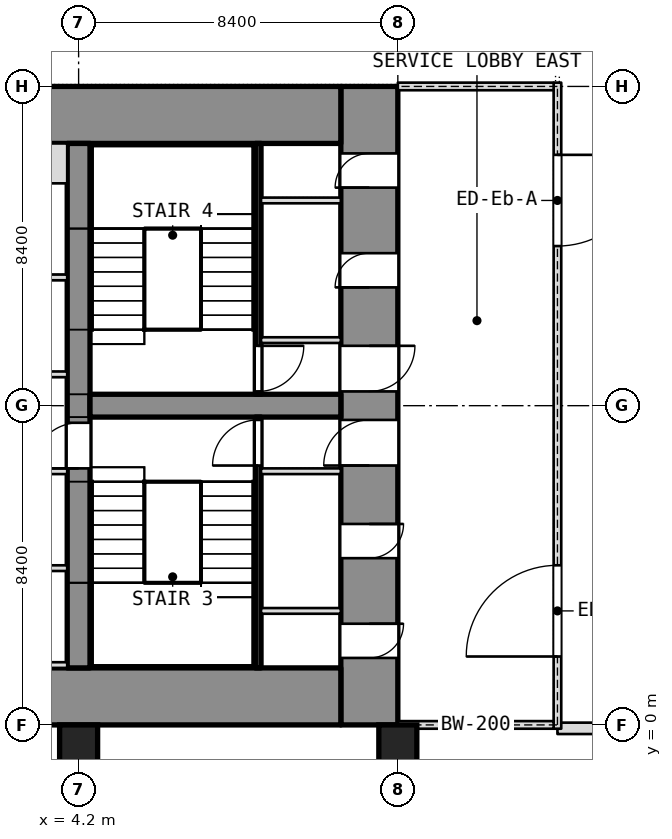
"""IFC4 building model, lengths in metres.
Left out: names, types, materials, properties, quantities, classifications, styles, units other than length and angle.
Written with IfcOpenShell. Run it as: python <this file> out.ifc"""

import sys

from ifc_helpers import new_model, si_unit, direction, frame, frame_2d, origin, origin_2d, place, context, subcontext, project, spatial, rectangle, extrude, element, fill, save


model = new_model("IFC4")
c1 = context("Model", 3, precision=1e-05, world=origin(), true_north=direction((0.0, 1.0)))
c2 = subcontext(c1, "Body", "Model", "MODEL_VIEW")
j1 = project(units=[si_unit("LENGTHUNIT", "METRE"), si_unit("PLANEANGLEUNIT", "RADIAN")], contexts=[c1])
p1 = place(None, origin())
s1 = spatial("IfcSite", under=j1, at=p1, CompositionType="ELEMENT")
p2 = place(p1, origin())
s2 = spatial("IfcBuilding", under=s1, at=p2, CompositionType="ELEMENT")
p3 = place(p2, frame((0.0, 0.0, 21.0)))
s3 = spatial("IfcBuildingStorey", under=s2, at=p3, CompositionType="ELEMENT", Elevation=21.0)
p4 = place(p3, frame((11.85, 0.0, 0.0), z_axis=(0.0, 0.0, 1.0), x_axis=(0.0, 1.0, 0.0)))
e1 = element("IfcWall", 1, at=p4, inside=s3, PredefinedType="SHEAR", context=c2, shape_type="SweptSolid", body=[
    extrude(rectangle(XDim=16.8, YDim=1.5, at=frame_2d((8.4, 0.0))), origin(), (0.0, 0.0, 1.0), 5.0),
])
p5 = place(p4, frame((1.762, 0.0, 0.0)))
e2 = element("IfcOpeningElement", 2, at=p5, cuts=e1, PredefinedType="OPENING", context=c2, shape_type="SweptSolid", body=[
    extrude(rectangle(XDim=0.9, YDim=2.1, at=frame_2d((0.45, 1.05))), frame((0.0, 0.75, 0.0), z_axis=(0.0, -1.0, 0.0), x_axis=(1.0, 0.0, 0.0)), (0.0, 0.0, 1.0), 1.5),
])
p6 = place(p4, frame((4.387, 0.0, 0.0)))
e3 = element("IfcOpeningElement", 3, at=p6, cuts=e1, PredefinedType="OPENING", context=c2, shape_type="SweptSolid", body=[
    extrude(rectangle(XDim=0.9, YDim=2.1, at=frame_2d((0.45, 1.05))), frame((0.0, 0.75, 0.0), z_axis=(0.0, -1.0, 0.0), x_axis=(1.0, 0.0, 0.0)), (0.0, 0.0, 1.0), 1.5),
])
p7 = place(p4, frame((6.825, 0.0, 0.0)))
e4 = element("IfcOpeningElement", 4, at=p7, cuts=e1, PredefinedType="OPENING", context=c2, shape_type="SweptSolid", body=[
    extrude(rectangle(XDim=1.2, YDim=2.1, at=frame_2d((0.6, 1.05))), frame((0.0, 0.75, 0.0), z_axis=(0.0, -1.0, 0.0), x_axis=(1.0, 0.0, 0.0)), (0.0, 0.0, 1.0), 1.5),
])
p8 = place(p4, frame((14.137, 0.0, 0.0)))
e5 = element("IfcOpeningElement", 5, at=p8, cuts=e1, PredefinedType="OPENING", context=c2, shape_type="SweptSolid", body=[
    extrude(rectangle(XDim=0.9, YDim=2.1, at=frame_2d((0.45, 1.05))), frame((0.0, 0.75, 0.0), z_axis=(0.0, -1.0, 0.0), x_axis=(1.0, 0.0, 0.0)), (0.0, 0.0, 1.0), 1.5),
])
p9 = place(p4, frame((11.512, 0.0, 0.0)))
e6 = element("IfcOpeningElement", 6, at=p9, cuts=e1, PredefinedType="OPENING", context=c2, shape_type="SweptSolid", body=[
    extrude(rectangle(XDim=0.9, YDim=2.1, at=frame_2d((0.45, 1.05))), frame((0.0, 0.75, 0.0), z_axis=(0.0, -1.0, 0.0), x_axis=(1.0, 0.0, 0.0)), (0.0, 0.0, 1.0), 1.5),
])
p10 = place(p4, frame((8.775, 0.0, 0.0)))
e7 = element("IfcOpeningElement", 7, at=p10, cuts=e1, PredefinedType="OPENING", context=c2, shape_type="SweptSolid", body=[
    extrude(rectangle(XDim=1.2, YDim=2.1, at=frame_2d((0.6, 1.05))), frame((0.0, 0.75, 0.0), z_axis=(0.0, -1.0, 0.0), x_axis=(1.0, 0.0, 0.0)), (0.0, 0.0, 1.0), 1.5),
])
for number, where, z_axis, x_axis in (
    (8, (-11.1, 0.75, 0.0), (0.0, 0.0, 1.0), (1.0, 0.0, 0.0)),
    (9, (-11.1, 16.05, 0.0), (0.0, 0.0, 1.0), (1.0, 0.0, 0.0)),
):
    element("IfcWall", number, at=place(p3, frame(where, z_axis=z_axis, x_axis=x_axis)), inside=s3, PredefinedType="SHEAR", context=c2, shape_type="SweptSolid", body=[
        extrude(rectangle(XDim=22.2, YDim=1.5, at=frame_2d((11.1, 0.0))), origin(), (0.0, 0.0, 1.0), 5.0),
    ])
p11 = place(p3, frame((4.2, 1.5, 0.0), z_axis=(0.0, 0.0, 1.0), x_axis=(0.0, 1.0, 0.0)))
e10 = element("IfcWall", 10, at=p11, inside=s3, PredefinedType="SHEAR", context=c2, shape_type="SweptSolid", body=[
    extrude(rectangle(XDim=13.8, YDim=0.6, at=frame_2d((6.9, 0.0))), origin(), (0.0, 0.0, 1.0), 5.0),
])
p12 = place(p11, frame((5.25, 0.0, 0.0)))
e11 = element("IfcOpeningElement", 11, at=p12, cuts=e10, PredefinedType="OPENING", context=c2, shape_type="SweptSolid", body=[
    extrude(rectangle(XDim=1.2, YDim=2.1, at=frame_2d((0.6, 1.05))), frame((0.0, 0.3, 0.0), z_axis=(0.0, -1.0, 0.0), x_axis=(1.0, 0.0, 0.0)), (0.0, 0.0, 1.0), 0.6),
])
p13 = place(p3, frame((4.5, 8.4, 0.0), z_axis=(0.0, 0.0, 1.0), x_axis=(1.0, 0.0, 0.0)))
e12 = element("IfcWall", 12, at=p13, inside=s3, PredefinedType="SHEAR", context=c2, shape_type="SweptSolid", body=[
    extrude(rectangle(XDim=6.6, YDim=0.6, at=frame_2d((3.3, 0.0))), origin(), (0.0, 0.0, 1.0), 5.0),
])
for number, where, z_axis, x_axis in (
    (13, (4.2, -0.5, 0.0), (0.0, 0.0, 1.0), (1.0, 0.0, 0.0)),
    (14, (12.6, -0.5, 0.0), (0.0, 0.0, 1.0), (1.0, 0.0, 0.0)),
):
    element("IfcColumn", number, at=place(p3, frame(where, z_axis=z_axis, x_axis=x_axis)), inside=s3, PredefinedType="COLUMN", context=c2, shape_type="SweptSolid", body=[
        extrude(rectangle(XDim=1.0, YDim=1.0, at=origin_2d()), origin(), (0.0, 0.0, 1.0), 5.0),
    ])
p14 = place(p3, frame((16.8, -0.09, 0.0), z_axis=(0.0, 0.0, 1.0), x_axis=(1.0, 0.0, 0.0)))
e15 = element("IfcWall", 15, at=p14, inside=s3, PredefinedType="NOTDEFINED", context=c2, shape_type="SweptSolid", body=[
    extrude(rectangle(XDim=3.26, YDim=0.3, at=frame_2d((1.63, 0.0))), origin(), (0.0, 0.0, 1.0), 5.0),
])
p15 = place(p3, frame((8.925, 1.5, 0.0), z_axis=(0.0, 0.0, 1.0), x_axis=(0.0, 1.0, 0.0)))
e16 = element("IfcWall", 16, at=p15, inside=s3, PredefinedType="SHEAR", context=c2, shape_type="SweptSolid", body=[
    extrude(rectangle(XDim=6.6, YDim=0.15, at=frame_2d((3.3, 0.0))), origin(), (0.0, 0.0, 1.0), 4.78),
])
p16 = place(p15, frame((5.325, 0.0, 0.0)))
e17 = element("IfcOpeningElement", 17, at=p16, cuts=e16, PredefinedType="OPENING", context=c2, shape_type="SweptSolid", body=[
    extrude(rectangle(XDim=1.2, YDim=2.1, at=frame_2d((0.6, 1.05))), frame((0.0, 0.075, 0.0), z_axis=(0.0, -1.0, 0.0), x_axis=(1.0, 0.0, 0.0)), (0.0, 0.0, 1.0), 0.15),
])
for number, where, z_axis, x_axis in (
    (18, (9.0, 6.675, 0.0), (0.0, 0.0, 1.0), (1.0, 0.0, 0.0)),
    (19, (9.0, 3.0, 0.0), (0.0, 0.0, 1.0), (1.0, 0.0, 0.0)),
):
    element("IfcWall", number, at=place(p3, frame(where, z_axis=z_axis, x_axis=x_axis)), inside=s3, PredefinedType="PARTITIONING", context=c2, shape_type="SweptSolid", body=[
        extrude(rectangle(XDim=2.1, YDim=0.15, at=frame_2d((1.05, 0.0))), origin(), (0.0, 0.0, 1.0), 4.78),
    ])
p17 = place(p3, frame((8.925, 8.7, 0.0), z_axis=(0.0, 0.0, 1.0), x_axis=(0.0, 1.0, 0.0)))
e20 = element("IfcWall", 20, at=p17, inside=s3, PredefinedType="SHEAR", context=c2, shape_type="SweptSolid", body=[
    extrude(rectangle(XDim=6.6, YDim=0.15, at=frame_2d((3.3, 0.0))), origin(), (0.0, 0.0, 1.0), 4.78),
])
p18 = place(p17, frame((0.075, 0.0, 0.0)))
e21 = element("IfcOpeningElement", 21, at=p18, cuts=e20, PredefinedType="OPENING", context=c2, shape_type="SweptSolid", body=[
    extrude(rectangle(XDim=1.2, YDim=2.1, at=frame_2d((0.6, 1.05))), frame((0.0, 0.075, 0.0), z_axis=(0.0, -1.0, 0.0), x_axis=(1.0, 0.0, 0.0)), (0.0, 0.0, 1.0), 0.15),
])
for number, where, z_axis, x_axis in (
    (22, (9.0, 10.125, 0.0), (0.0, 0.0, 1.0), (1.0, 0.0, 0.0)),
    (23, (9.0, 13.8, 0.0), (0.0, 0.0, 1.0), (1.0, 0.0, 0.0)),
):
    element("IfcWall", number, at=place(p3, frame(where, z_axis=z_axis, x_axis=x_axis)), inside=s3, PredefinedType="PARTITIONING", context=c2, shape_type="SweptSolid", body=[
        extrude(rectangle(XDim=2.1, YDim=0.15, at=frame_2d((1.05, 0.0))), origin(), (0.0, 0.0, 1.0), 4.78),
    ])
p19 = place(p3, frame((-3.9, 4.125, 0.0), z_axis=(0.0, 0.0, 1.0), x_axis=(1.0, 0.0, 0.0)))
e24 = element("IfcWall", 24, at=p19, inside=s3, PredefinedType="PARTITIONING", context=c2, shape_type="SweptSolid", body=[
    extrude(rectangle(XDim=7.8, YDim=0.15, at=frame_2d((3.9, 0.0))), origin(), (0.0, 0.0, 1.0), 4.78),
])
p20 = place(p19, frame((3.75, 0.0, 0.0)))
e25 = element("IfcOpeningElement", 25, at=p20, cuts=e24, PredefinedType="OPENING", context=c2, shape_type="SweptSolid", body=[
    extrude(rectangle(XDim=1.2, YDim=2.1, at=frame_2d((0.6, 1.05))), frame((0.0, 0.075, 0.0), z_axis=(0.0, -1.0, 0.0), x_axis=(1.0, 0.0, 0.0)), (0.0, 0.0, 1.0), 0.15),
])
p21 = place(p3, frame((-3.9, 11.775, 0.0), z_axis=(0.0, 0.0, 1.0), x_axis=(1.0, 0.0, 0.0)))
e26 = element("IfcWall", 26, at=p21, inside=s3, PredefinedType="PARTITIONING", context=c2, shape_type="SweptSolid", body=[
    extrude(rectangle(XDim=7.8, YDim=0.15, at=frame_2d((3.9, 0.0))), origin(), (0.0, 0.0, 1.0), 4.78),
])
p22 = place(p21, frame((3.3, 0.0, 0.0)))
e27 = element("IfcOpeningElement", 27, at=p22, cuts=e26, PredefinedType="OPENING", context=c2, shape_type="SweptSolid", body=[
    extrude(rectangle(XDim=1.2, YDim=2.1, at=frame_2d((0.6, 1.05))), frame((0.0, 0.075, 0.0), z_axis=(0.0, -1.0, 0.0), x_axis=(1.0, 0.0, 0.0)), (0.0, 0.0, 1.0), 0.15),
])
p23 = place(p3, frame((1.65, 1.575, 0.0), z_axis=(0.0, 0.0, 1.0), x_axis=(1.0, 0.0, 0.0)))
e28 = element("IfcWall", 28, at=p23, inside=s3, PredefinedType="SHEAR", context=c2, shape_type="SweptSolid", body=[
    extrude(rectangle(XDim=2.25, YDim=0.15, at=frame_2d((1.125, 0.0))), origin(), (0.0, 0.0, 1.0), 5.0),
])
p24 = place(p3, frame((1.65, 14.775, 0.0), z_axis=(0.0, 0.0, 1.0), x_axis=(1.0, 0.0, 0.0)))
e29 = element("IfcWall", 29, at=p24, inside=s3, PredefinedType="SHEAR", context=c2, shape_type="SweptSolid", body=[
    extrude(rectangle(XDim=2.25, YDim=1.05, at=frame_2d((1.125, 0.0))), origin(), (0.0, 0.0, 1.0), 5.0),
])
for number, where, z_axis, x_axis in (
    (30, (1.65, 6.675, 0.0), (0.0, 0.0, 1.0), (1.0, 0.0, 0.0)),
    (31, (1.65, 9.225, 0.0), (0.0, 0.0, 1.0), (1.0, 0.0, 0.0)),
):
    element("IfcWall", number, at=place(p3, frame(where, z_axis=z_axis, x_axis=x_axis)), inside=s3, PredefinedType="SHEAR", context=c2, shape_type="SweptSolid", body=[
        extrude(rectangle(XDim=2.25, YDim=0.15, at=frame_2d((1.125, 0.0))), origin(), (0.0, 0.0, 1.0), 5.0),
    ])
p25 = place(p3, frame((16.8, -0.1, 0.0), z_axis=(0.0, 0.0, 1.0), x_axis=(0.0, 1.0, 0.0)))
e32 = element("IfcWall", 32, at=p25, inside=s3, PredefinedType="PARTITIONING", context=c2, shape_type="SweptSolid", body=[
    extrude(rectangle(XDim=17.0, YDim=0.2, at=frame_2d((8.5, 0.0))), origin(), (0.0, 0.0, 1.0), 4.78),
])
p26 = place(p25, frame((1.9, 0.0, 0.0)))
e33 = element("IfcOpeningElement", 33, at=p26, cuts=e32, PredefinedType="OPENING", context=c2, shape_type="SweptSolid", body=[
    extrude(rectangle(XDim=2.4, YDim=2.1, at=frame_2d((1.2, 1.05))), frame((0.0, 0.1, 0.0), z_axis=(0.0, -1.0, 0.0), x_axis=(1.0, 0.0, 0.0)), (0.0, 0.0, 1.0), 0.2),
])
p27 = place(p25, frame((12.7, 0.0, 0.0)))
e34 = element("IfcOpeningElement", 34, at=p27, cuts=e32, PredefinedType="OPENING", context=c2, shape_type="SweptSolid", body=[
    extrude(rectangle(XDim=2.4, YDim=2.1, at=frame_2d((1.2, 1.05))), frame((0.0, 0.1, 0.0), z_axis=(0.0, -1.0, 0.0), x_axis=(1.0, 0.0, 0.0)), (0.0, 0.0, 1.0), 0.2),
])
for number, where, z_axis, x_axis in (
    (35, (12.6, 0.0, 0.0), (0.0, 0.0, 1.0), (1.0, 0.0, 0.0)),
    (36, (12.6, 16.8, 0.0), (0.0, 0.0, 1.0), (1.0, 0.0, 0.0)),
):
    element("IfcWall", number, at=place(p3, frame(where, z_axis=z_axis, x_axis=x_axis)), inside=s3, PredefinedType="PARTITIONING", context=c2, shape_type="SweptSolid", body=[
        extrude(rectangle(XDim=4.1, YDim=0.2, at=frame_2d((2.05, 0.0))), origin(), (0.0, 0.0, 1.0), 4.78),
    ])
p28 = place(p5, origin())
e37 = element("IfcDoor", 37, at=p28, inside=s3, OperationType="SINGLE_SWING_LEFT", PredefinedType="DOOR", context=c2, shape_type="SweptSolid", body=[
    extrude(rectangle(XDim=0.9, YDim=2.1, at=frame_2d((0.45, 1.05))), frame((0.0, 0.025, 0.0), z_axis=(0.0, -1.0, 0.0), x_axis=(1.0, 0.0, 0.0)), (0.0, 0.0, 1.0), 0.05),
])
fill(e2, e37)
p29 = place(p6, origin())
e38 = element("IfcDoor", 38, at=p29, inside=s3, OperationType="SINGLE_SWING_LEFT", PredefinedType="DOOR", context=c2, shape_type="SweptSolid", body=[
    extrude(rectangle(XDim=0.9, YDim=2.1, at=frame_2d((0.45, 1.05))), frame((0.0, 0.025, 0.0), z_axis=(0.0, -1.0, 0.0), x_axis=(1.0, 0.0, 0.0)), (0.0, 0.0, 1.0), 0.05),
])
fill(e3, e38)
p30 = place(p7, origin())
e39 = element("IfcDoor", 39, at=p30, inside=s3, OperationType="SINGLE_SWING_LEFT", PredefinedType="DOOR", context=c2, shape_type="SweptSolid", body=[
    extrude(rectangle(XDim=1.2, YDim=2.1, at=frame_2d((0.6, 1.05))), frame((0.0, 0.025, 0.0), z_axis=(0.0, -1.0, 0.0), x_axis=(1.0, 0.0, 0.0)), (0.0, 0.0, 1.0), 0.05),
])
fill(e4, e39)
p31 = place(p16, origin())
e40 = element("IfcDoor", 40, at=p31, inside=s3, OperationType="SINGLE_SWING_LEFT", PredefinedType="DOOR", context=c2, shape_type="SweptSolid", body=[
    extrude(rectangle(XDim=1.2, YDim=2.1, at=frame_2d((0.6, 1.05))), frame((0.0, 0.025, 0.0), z_axis=(0.0, -1.0, 0.0), x_axis=(1.0, 0.0, 0.0)), (0.0, 0.0, 1.0), 0.05),
])
fill(e17, e40)
p32 = place(p8, origin())
e41 = element("IfcDoor", 41, at=p32, inside=s3, OperationType="SINGLE_SWING_LEFT", PredefinedType="DOOR", context=c2, shape_type="SweptSolid", body=[
    extrude(rectangle(XDim=0.9, YDim=2.1, at=frame_2d((0.45, 1.05))), frame((0.0, 0.025, 0.0), z_axis=(0.0, -1.0, 0.0), x_axis=(1.0, 0.0, 0.0)), (0.0, 0.0, 1.0), 0.05),
])
fill(e5, e41)
p33 = place(p9, origin())
e42 = element("IfcDoor", 42, at=p33, inside=s3, OperationType="SINGLE_SWING_LEFT", PredefinedType="DOOR", context=c2, shape_type="SweptSolid", body=[
    extrude(rectangle(XDim=0.9, YDim=2.1, at=frame_2d((0.45, 1.05))), frame((0.0, 0.025, 0.0), z_axis=(0.0, -1.0, 0.0), x_axis=(1.0, 0.0, 0.0)), (0.0, 0.0, 1.0), 0.05),
])
fill(e6, e42)
p34 = place(p10, origin())
e43 = element("IfcDoor", 43, at=p34, inside=s3, OperationType="SINGLE_SWING_LEFT", PredefinedType="DOOR", context=c2, shape_type="SweptSolid", body=[
    extrude(rectangle(XDim=1.2, YDim=2.1, at=frame_2d((0.6, 1.05))), frame((0.0, 0.025, 0.0), z_axis=(0.0, -1.0, 0.0), x_axis=(1.0, 0.0, 0.0)), (0.0, 0.0, 1.0), 0.05),
])
fill(e7, e43)
p35 = place(p18, origin())
e44 = element("IfcDoor", 44, at=p35, inside=s3, OperationType="SINGLE_SWING_LEFT", PredefinedType="DOOR", context=c2, shape_type="SweptSolid", body=[
    extrude(rectangle(XDim=1.2, YDim=2.1, at=frame_2d((0.6, 1.05))), frame((0.0, 0.025, 0.0), z_axis=(0.0, -1.0, 0.0), x_axis=(1.0, 0.0, 0.0)), (0.0, 0.0, 1.0), 0.05),
])
fill(e21, e44)
p36 = place(p12, origin())
e45 = element("IfcDoor", 45, at=p36, inside=s3, OperationType="SINGLE_SWING_LEFT", PredefinedType="DOOR", context=c2, shape_type="SweptSolid", body=[
    extrude(rectangle(XDim=1.2, YDim=2.1, at=frame_2d((0.6, 1.05))), frame((0.0, 0.025, 0.0), z_axis=(0.0, -1.0, 0.0), x_axis=(1.0, 0.0, 0.0)), (0.0, 0.0, 1.0), 0.05),
])
fill(e11, e45)
p37 = place(p26, origin())
e46 = element("IfcDoor", 46, at=p37, inside=s3, OperationType="DOUBLE_DOOR_SINGLE_SWING", PredefinedType="DOOR", context=c2, shape_type="SweptSolid", body=[
    extrude(rectangle(XDim=2.4, YDim=2.1, at=frame_2d((1.2, 1.05))), frame((0.0, 0.025, 0.0), z_axis=(0.0, -1.0, 0.0), x_axis=(1.0, 0.0, 0.0)), (0.0, 0.0, 1.0), 0.05),
])
fill(e33, e46)
p38 = place(p27, origin())
e47 = element("IfcDoor", 47, at=p38, inside=s3, OperationType="DOUBLE_DOOR_SINGLE_SWING", PredefinedType="DOOR", context=c2, shape_type="SweptSolid", body=[
    extrude(rectangle(XDim=2.4, YDim=2.1, at=frame_2d((1.2, 1.05))), frame((0.0, 0.025, 0.0), z_axis=(0.0, -1.0, 0.0), x_axis=(1.0, 0.0, 0.0)), (0.0, 0.0, 1.0), 0.05),
])
fill(e34, e47)
save(model, sys.argv[1])
